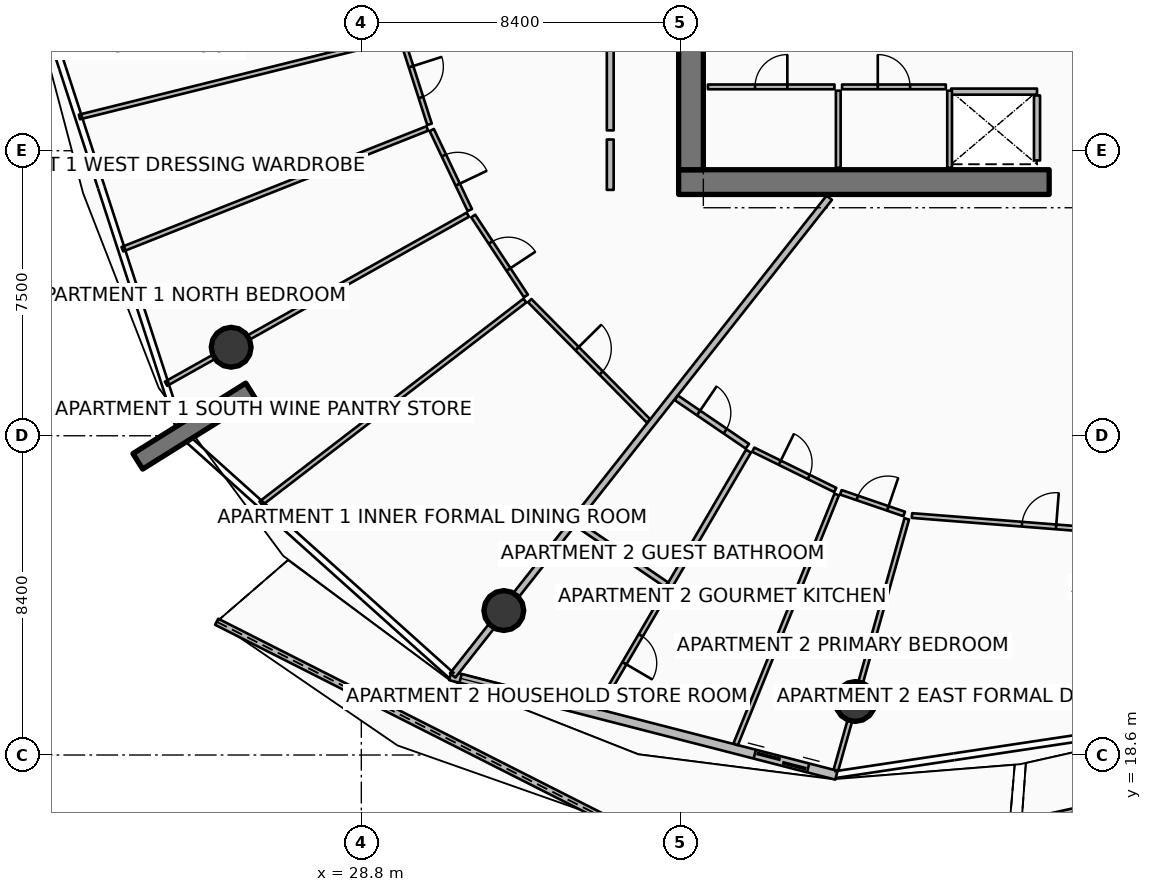
"""IFC4 building model, lengths in metres.
Left out: names, types, materials, properties, quantities, classifications, styles, units other than length and angle.
Written with IfcOpenShell. Run it as: python <this file> out.ifc"""

import sys

from ifc_helpers import new_model, si_unit, direction, frame, frame_2d, origin, origin_2d, place, context, subcontext, project, spatial, polyline, rectangle, circle, outline, extrude, element, fill, save


model = new_model("IFC4")
c1 = context("Model", 3, precision=1e-05, world=origin(), true_north=direction((0.0, 1.0)))
c2 = subcontext(c1, "Body", "Model", "MODEL_VIEW")
j1 = project(units=[si_unit("LENGTHUNIT", "METRE"), si_unit("PLANEANGLEUNIT", "RADIAN")], contexts=[c1])
p1 = place(None, origin())
s1 = spatial("IfcSite", under=j1, at=p1, CompositionType="ELEMENT")
p2 = place(p1, origin())
s2 = spatial("IfcBuilding", under=s1, at=p2, CompositionType="ELEMENT")
p3 = place(p2, frame((0.0, 0.0, 217.8)))
s3 = spatial("IfcBuildingStorey", under=s2, at=p3, CompositionType="ELEMENT", Elevation=217.8)
p4 = place(p3, frame((37.15, 33.675, 0.0), z_axis=(0.0, 0.0, 1.0), x_axis=(1.0, 0.0, 0.0)))
e1 = element("IfcWall", 1, at=p4, inside=s3, PredefinedType="SHEAR", context=c2, shape_type="SweptSolid", body=[
    extrude(rectangle(XDim=9.75, YDim=0.65, at=frame_2d((4.875, 0.0))), origin(), (0.0, 0.0, 1.0), 3.75),
])
p5 = place(p3, frame((37.475, 34.0, 0.0), z_axis=(0.0, 0.0, 1.0), x_axis=(0.0, 1.0, 0.0)))
e2 = element("IfcWall", 2, at=p5, inside=s3, PredefinedType="SHEAR", context=c2, shape_type="SweptSolid", body=[
    extrude(rectangle(XDim=16.0, YDim=0.65, at=frame_2d((8.0, 0.0))), origin(), (0.0, 0.0, 1.0), 3.75),
])
p6 = place(p3, frame((25.886, 28.182, 0.0), z_axis=(0.0, 0.0, 1.0), x_axis=(-0.848033572426, -0.529942506352, 0.0)))
e3 = element("IfcWall", 3, at=p6, inside=s3, PredefinedType="SOLIDWALL", context=c2, shape_type="SweptSolid", body=[
    extrude(rectangle(XDim=3.5, YDim=0.48, at=frame_2d((1.75, 0.0))), origin(), (0.0, 0.0, 1.0), 3.75),
])
for number, where, z_axis, x_axis in (
    (4, (25.375, 29.329, 0.0), (0.0, 0.0, 1.0), (1.0, 0.0, 0.0)),
    (5, (32.549, 22.401, 0.0), (0.0, 0.0, 1.0), (1.0, 0.0, 0.0)),
    (6, (41.798, 20.008, 0.0), (0.0, 0.0, 1.0), (1.0, 0.0, 0.0)),
):
    element("IfcColumn", number, at=place(p3, frame(where, z_axis=z_axis, x_axis=x_axis)), inside=s3, PredefinedType="COLUMN", context=c2, shape_type="SweptSolid", body=[
        extrude(circle(Radius=0.525, at=origin_2d()), origin(), (0.0, 0.0, 1.0), 3.5),
    ])
p7 = place(p3, frame((24.994, 22.107, 0.0), z_axis=(0.0, 0.0, 1.0), x_axis=(0.892126203774, -0.451786273076, 0.0)))
e7 = element("IfcWall", 7, at=p7, inside=s3, PredefinedType="PARAPET", context=c2, shape_type="SweptSolid", body=[
    extrude(outline(polyline([(0.0, 0.0), (11.347, 0.0), (11.347, 1.348), (5.674, 1.562), (0.0, 1.747), (0.0, 0.0)])), frame((0.0, 0.09, 0.0), z_axis=(0.0, -1.0, 0.0), x_axis=(1.0, 0.0, 0.0)), (0.0, 0.0, 1.0), 0.18),
])
p8 = place(p3, frame((46.172, 16.807, 0.0), z_axis=(0.0, 0.0, 1.0), x_axis=(0.976834914213, 0.213994276499, 0.0)))
e8 = element("IfcWall", 8, at=p8, inside=s3, PredefinedType="PARAPET", context=c2, shape_type="SweptSolid", body=[
    extrude(outline(polyline([(0.0, 0.0), (9.45, 0.0), (9.45, 1.348), (4.725, 1.182), (0.0, 1.12), (0.0, 0.0)])), frame((0.0, 0.09, 0.0), z_axis=(0.0, -1.0, 0.0), x_axis=(1.0, 0.0, 0.0)), (0.0, 0.0, 1.0), 0.18),
])
p9 = place(p3, frame((31.14, 20.687, 0.0), z_axis=(0.0, 0.0, 1.0), x_axis=(0.968374028006, -0.249502989727, 0.0)))
e9 = element("IfcWall", 9, at=p9, inside=s3, PredefinedType="SOLIDWALL", context=c2, shape_type="SweptSolid", body=[
    extrude(rectangle(XDim=10.494, YDim=0.24, at=frame_2d((5.247, 0.0))), origin(), (0.0, 0.0, 1.0), 2.45),
])
p10 = place(p9, frame((8.274, 0.0, 0.0)))
e10 = element("IfcOpeningElement", 10, at=p10, cuts=e9, PredefinedType="OPENING", context=c2, shape_type="SweptSolid", body=[
    extrude(rectangle(XDim=1.45, YDim=2.15, at=frame_2d((0.725, 1.075))), frame((0.0, 0.13, 0.0), z_axis=(0.0, -1.0, 0.0), x_axis=(1.0, 0.0, 0.0)), (0.0, 0.0, 1.0), 0.26),
])
p11 = place(p9, frame((0.28, 0.0, 0.65)))
e11 = element("IfcOpeningElement", 11, at=p11, cuts=e9, PredefinedType="OPENING", context=c2, shape_type="SweptSolid", body=[
    extrude(rectangle(XDim=1.6, YDim=1.5, at=frame_2d((0.8, 0.75))), frame((0.0, 0.13, 0.0), z_axis=(0.0, -1.0, 0.0), x_axis=(1.0, 0.0, 0.0)), (0.0, 0.0, 1.0), 0.26),
])
p12 = place(p3, frame((44.32, 36.055, 0.0), z_axis=(0.0, 0.0, 1.0), x_axis=(1.0, 0.0, 0.0)))
e12 = element("IfcWall", 12, at=p12, inside=s3, PredefinedType="PARTITIONING", context=c2, shape_type="SweptSolid", body=[
    extrude(rectangle(XDim=2.26, YDim=0.16, at=frame_2d((1.13, 0.0))), origin(), (0.0, 0.0, 1.0), 3.5),
])
p13 = place(p3, frame((46.58, 34.245, 0.0), z_axis=(0.0, 0.0, 1.0), x_axis=(0.0, 1.0, 0.0)))
e13 = element("IfcWall", 13, at=p13, inside=s3, PredefinedType="PARTITIONING", context=c2, shape_type="SweptSolid", body=[
    extrude(rectangle(XDim=1.71, YDim=0.16, at=frame_2d((0.855, 0.0))), origin(), (0.0, 0.0, 1.0), 3.5),
])
for number, where, z_axis, x_axis in (
    (14, (44.28, 34.05, 0.0), (0.0, 0.0, 1.0), (0.0, 1.0, 0.0)),
    (15, (41.35, 34.05, 0.0), (0.0, 0.0, 1.0), (0.0, 1.0, 0.0)),
):
    element("IfcWall", number, at=place(p3, frame(where, z_axis=z_axis, x_axis=x_axis)), inside=s3, PredefinedType="PARTITIONING", context=c2, shape_type="SweptSolid", body=[
        extrude(rectangle(XDim=2.03, YDim=0.125, at=frame_2d((1.015, 0.0))), origin(), (0.0, 0.0, 1.0), 2.94),
    ])
p14 = place(p3, frame((37.92, 36.18, 0.0), z_axis=(0.0, 0.0, 1.0), x_axis=(1.0, 0.0, 0.0)))
e16 = element("IfcWall", 16, at=p14, inside=s3, PredefinedType="PARTITIONING", context=c2, shape_type="SweptSolid", body=[
    extrude(rectangle(XDim=3.33, YDim=0.125, at=frame_2d((1.665, 0.0))), origin(), (0.0, 0.0, 1.0), 2.94),
])
p15 = place(p14, frame((1.24, 0.0, 0.0)))
e17 = element("IfcOpeningElement", 17, at=p15, cuts=e16, PredefinedType="OPENING", context=c2, shape_type="SweptSolid", body=[
    extrude(rectangle(XDim=0.85, YDim=2.06, at=frame_2d((0.425, 1.03))), frame((0.0, 0.073, 0.0), z_axis=(0.0, -1.0, 0.0), x_axis=(1.0, 0.0, 0.0)), (0.0, 0.0, 1.0), 0.145),
])
p16 = place(p3, frame((41.45, 36.18, 0.0), z_axis=(0.0, 0.0, 1.0), x_axis=(1.0, 0.0, 0.0)))
e18 = element("IfcWall", 18, at=p16, inside=s3, PredefinedType="PARTITIONING", context=c2, shape_type="SweptSolid", body=[
    extrude(rectangle(XDim=2.73, YDim=0.125, at=frame_2d((1.365, 0.0))), origin(), (0.0, 0.0, 1.0), 2.94),
])
p17 = place(p16, frame((0.94, 0.0, 0.0)))
e19 = element("IfcOpeningElement", 19, at=p17, cuts=e18, PredefinedType="OPENING", context=c2, shape_type="SweptSolid", body=[
    extrude(rectangle(XDim=0.85, YDim=2.06, at=frame_2d((0.425, 1.03))), frame((0.0, 0.073, 0.0), z_axis=(0.0, -1.0, 0.0), x_axis=(1.0, 0.0, 0.0)), (0.0, 0.0, 1.0), 0.145),
])
p18 = place(p3, frame((41.113, 33.264, 0.0), z_axis=(0.0, 0.0, 1.0), x_axis=(-0.619089233189, -0.785320648748, 0.0)))
e20 = element("IfcWall", 20, at=p18, inside=s3, PredefinedType="PARTITIONING", context=c2, shape_type="SweptSolid", body=[
    extrude(rectangle(XDim=16.006, YDim=0.18, at=frame_2d((8.003, 0.0))), origin(), (0.0, 0.0, 1.0), 2.94),
])
p19 = place(p3, frame((35.35, 40.383, 0.0), z_axis=(0.0, 0.0, 1.0), x_axis=(0.0, -1.0, 0.0)))
e21 = element("IfcWall", 21, at=p19, inside=s3, PredefinedType="PARTITIONING", context=c2, shape_type="SweptSolid", body=[
    extrude(rectangle(XDim=5.347, YDim=0.18, at=frame_2d((2.674, 0.0))), origin(), (0.0, 0.0, 1.0), 2.94),
])
p20 = place(p3, frame((29.77, 37.472, 0.0), z_axis=(0.0, 0.0, 1.0), x_axis=(-0.970505283608, -0.241079850857, 0.0)))
e22 = element("IfcWall", 22, at=p20, inside=s3, PredefinedType="PARTITIONING", context=c2, shape_type="SweptSolid", body=[
    extrude(rectangle(XDim=8.643, YDim=0.125, at=frame_2d((4.322, 0.0))), origin(), (0.0, 0.0, 1.0), 2.94),
])
p21 = place(p3, frame((30.535, 35.085, 0.0), z_axis=(0.0, 0.0, 1.0), x_axis=(-0.929776352491, -0.368124889607, 0.0)))
e23 = element("IfcWall", 23, at=p21, inside=s3, PredefinedType="PARTITIONING", context=c2, shape_type="SweptSolid", body=[
    extrude(rectangle(XDim=8.629, YDim=0.125, at=frame_2d((4.314, 0.0))), origin(), (0.0, 0.0, 1.0), 2.94),
])
p22 = place(p3, frame((29.882, 37.417, 0.0), z_axis=(0.0, 0.0, 1.0), x_axis=(0.305348810802, -0.952240570309, 0.0)))
e24 = element("IfcWall", 24, at=p22, inside=s3, PredefinedType="PARTITIONING", context=c2, shape_type="SweptSolid", body=[
    extrude(rectangle(XDim=2.334, YDim=0.125, at=frame_2d((1.167, 0.0))), origin(), (0.0, 0.0, 1.0), 2.94),
])
p23 = place(p22, frame((0.742, 0.0, 0.0)))
e25 = element("IfcOpeningElement", 25, at=p23, cuts=e24, PredefinedType="OPENING", context=c2, shape_type="SweptSolid", body=[
    extrude(rectangle(XDim=0.85, YDim=2.06, at=frame_2d((0.425, 1.03))), frame((0.0, 0.073, 0.0), z_axis=(0.0, -1.0, 0.0), x_axis=(1.0, 0.0, 0.0)), (0.0, 0.0, 1.0), 0.145),
])
p24 = place(p3, frame((30.653, 35.046, 0.0), z_axis=(0.0, 0.0, 1.0), x_axis=(0.429385363207, -0.903121370506, 0.0)))
e26 = element("IfcWall", 26, at=p24, inside=s3, PredefinedType="PARTITIONING", context=c2, shape_type="SweptSolid", body=[
    extrude(rectangle(XDim=2.334, YDim=0.125, at=frame_2d((1.167, 0.0))), origin(), (0.0, 0.0, 1.0), 2.94),
])
p25 = place(p24, frame((0.742, 0.0, 0.0)))
e27 = element("IfcOpeningElement", 27, at=p25, cuts=e26, PredefinedType="OPENING", context=c2, shape_type="SweptSolid", body=[
    extrude(rectangle(XDim=0.85, YDim=2.06, at=frame_2d((0.425, 1.03))), frame((0.0, 0.073, 0.0), z_axis=(0.0, -1.0, 0.0), x_axis=(1.0, 0.0, 0.0)), (0.0, 0.0, 1.0), 0.145),
])
p26 = place(p3, frame((35.35, 34.796, 0.0), z_axis=(0.0, 0.0, 1.0), x_axis=(0.0, -1.0, 0.0)))
e28 = element("IfcWall", 28, at=p26, inside=s3, PredefinedType="PARTITIONING", context=c2, shape_type="SweptSolid", body=[
    extrude(rectangle(XDim=1.326, YDim=0.18, at=frame_2d((0.663, 0.0))), origin(), (0.0, 0.0, 1.0), 2.94),
])
p27 = place(p3, frame((31.602, 32.817, 0.0), z_axis=(0.0, 0.0, 1.0), x_axis=(-0.872494579812, -0.488623790047, 0.0)))
e29 = element("IfcWall", 29, at=p27, inside=s3, PredefinedType="PARTITIONING", context=c2, shape_type="SweptSolid", body=[
    extrude(rectangle(XDim=9.101, YDim=0.125, at=frame_2d((4.551, 0.0))), origin(), (0.0, 0.0, 1.0), 2.94),
])
p28 = place(p3, frame((33.104, 30.557, 0.0), z_axis=(0.0, 0.0, 1.0), x_axis=(-0.793029985802, -0.609182601212, 0.0)))
e30 = element("IfcWall", 30, at=p28, inside=s3, PredefinedType="PARTITIONING", context=c2, shape_type="SweptSolid", body=[
    extrude(rectangle(XDim=8.759, YDim=0.125, at=frame_2d((4.38, 0.0))), origin(), (0.0, 0.0, 1.0), 2.94),
])
p29 = place(p3, frame((31.745, 32.782, 0.0), z_axis=(0.0, 0.0, 1.0), x_axis=(0.550331787139, -0.834946060572, 0.0)))
e31 = element("IfcWall", 31, at=p29, inside=s3, PredefinedType="PARTITIONING", context=c2, shape_type="SweptSolid", body=[
    extrude(rectangle(XDim=2.519, YDim=0.125, at=frame_2d((1.26, 0.0))), origin(), (0.0, 0.0, 1.0), 2.94),
])
p30 = place(p29, frame((0.835, 0.0, 0.0)))
e32 = element("IfcOpeningElement", 32, at=p30, cuts=e31, PredefinedType="OPENING", context=c2, shape_type="SweptSolid", body=[
    extrude(rectangle(XDim=0.85, YDim=2.06, at=frame_2d((0.425, 1.03))), frame((0.0, 0.073, 0.0), z_axis=(0.0, -1.0, 0.0), x_axis=(1.0, 0.0, 0.0)), (0.0, 0.0, 1.0), 0.145),
])
p31 = place(p3, frame((33.231, 30.555, 0.0), z_axis=(0.0, 0.0, 1.0), x_axis=(0.702646714281, -0.711538892057, 0.0)))
e33 = element("IfcWall", 33, at=p31, inside=s3, PredefinedType="PARTITIONING", context=c2, shape_type="SweptSolid", body=[
    extrude(rectangle(XDim=4.448, YDim=0.125, at=frame_2d((2.224, 0.0))), origin(), (0.0, 0.0, 1.0), 2.94),
])
p32 = place(p31, frame((1.774, 0.0, 0.0)))
e34 = element("IfcOpeningElement", 34, at=p32, cuts=e33, PredefinedType="OPENING", context=c2, shape_type="SweptSolid", body=[
    extrude(rectangle(XDim=0.9, YDim=2.08, at=frame_2d((0.45, 1.04))), frame((0.0, 0.073, 0.0), z_axis=(0.0, -1.0, 0.0), x_axis=(1.0, 0.0, 0.0)), (0.0, 0.0, 1.0), 0.145),
])
p33 = place(p3, frame((37.089, 27.999, 0.0), z_axis=(0.0, 0.0, 1.0), x_axis=(0.826211362519, -0.563360261684, 0.0)))
e35 = element("IfcWall", 35, at=p33, inside=s3, PredefinedType="PARTITIONING", context=c2, shape_type="SweptSolid", body=[
    extrude(rectangle(XDim=2.263, YDim=0.15, at=frame_2d((1.131, 0.0))), origin(), (0.0, 0.0, 1.0), 2.94),
])
p34 = place(p33, frame((0.706, 0.0, 0.0)))
e36 = element("IfcOpeningElement", 36, at=p34, cuts=e35, PredefinedType="OPENING", context=c2, shape_type="SweptSolid", body=[
    extrude(rectangle(XDim=0.85, YDim=2.06, at=frame_2d((0.425, 1.03))), frame((0.0, 0.085, 0.0), z_axis=(0.0, -1.0, 0.0), x_axis=(1.0, 0.0, 0.0)), (0.0, 0.0, 1.0), 0.17),
])
p35 = place(p3, frame((34.477, 24.685, 0.0), z_axis=(0.0, 0.0, 1.0), x_axis=(0.826196481555, -0.563382085148, 0.0)))
e37 = element("IfcWall", 37, at=p35, inside=s3, PredefinedType="PARTITIONING", context=c2, shape_type="SweptSolid", body=[
    extrude(rectangle(XDim=2.845, YDim=0.15, at=frame_2d((1.423, 0.0))), origin(), (0.0, 0.0, 1.0), 2.94),
])
p36 = place(p3, frame((38.988, 26.596, 0.0), z_axis=(0.0, 0.0, 1.0), x_axis=(-0.504984010109, -0.863128698129, 0.0)))
e38 = element("IfcWall", 38, at=p36, inside=s3, PredefinedType="PARTITIONING", context=c2, shape_type="SweptSolid", body=[
    extrude(rectangle(XDim=4.09, YDim=0.15, at=frame_2d((2.045, 0.0))), origin(), (0.0, 0.0, 1.0), 2.94),
])
p37 = place(p3, frame((36.857, 22.953, 0.0), z_axis=(0.0, 0.0, 1.0), x_axis=(-0.504954980617, -0.863145681533, 0.0)))
e39 = element("IfcWall", 39, at=p37, inside=s3, PredefinedType="PARTITIONING", context=c2, shape_type="SweptSolid", body=[
    extrude(rectangle(XDim=3.64, YDim=0.125, at=frame_2d((1.82, 0.0))), origin(), (0.0, 0.0, 1.0), 2.94),
])
p38 = place(p37, frame((1.395, 0.0, 0.0)))
e40 = element("IfcOpeningElement", 40, at=p38, cuts=e39, PredefinedType="OPENING", context=c2, shape_type="SweptSolid", body=[
    extrude(rectangle(XDim=0.85, YDim=2.06, at=frame_2d((0.425, 1.03))), frame((0.0, 0.073, 0.0), z_axis=(0.0, -1.0, 0.0), x_axis=(1.0, 0.0, 0.0)), (0.0, 0.0, 1.0), 0.145),
])
p39 = place(p3, frame((41.309, 25.455, 0.0), z_axis=(0.0, 0.0, 1.0), x_axis=(-0.374907525365, -0.927062213352, 0.0)))
e41 = element("IfcWall", 41, at=p39, inside=s3, PredefinedType="PARTITIONING", context=c2, shape_type="SweptSolid", body=[
    extrude(rectangle(XDim=7.092, YDim=0.125, at=frame_2d((3.546, 0.0))), origin(), (0.0, 0.0, 1.0), 2.94),
])
p40 = place(p3, frame((39.114, 26.634, 0.0), z_axis=(0.0, 0.0, 1.0), x_axis=(0.897413929061, -0.441189573683, 0.0)))
e42 = element("IfcWall", 42, at=p40, inside=s3, PredefinedType="PARTITIONING", context=c2, shape_type="SweptSolid", body=[
    extrude(rectangle(XDim=2.403, YDim=0.125, at=frame_2d((1.202, 0.0))), origin(), (0.0, 0.0, 1.0), 2.94),
])
p41 = place(p40, frame((0.777, 0.0, 0.0)))
e43 = element("IfcOpeningElement", 43, at=p41, cuts=e42, PredefinedType="OPENING", context=c2, shape_type="SweptSolid", body=[
    extrude(rectangle(XDim=0.85, YDim=2.06, at=frame_2d((0.425, 1.03))), frame((0.0, 0.073, 0.0), z_axis=(0.0, -1.0, 0.0), x_axis=(1.0, 0.0, 0.0)), (0.0, 0.0, 1.0), 0.145),
])
p42 = place(p3, frame((41.418, 25.512, 0.0), z_axis=(0.0, 0.0, 1.0), x_axis=(0.946216458122, -0.32353425534, 0.0)))
e44 = element("IfcWall", 44, at=p42, inside=s3, PredefinedType="PARTITIONING", context=c2, shape_type="SweptSolid", body=[
    extrude(rectangle(XDim=1.762, YDim=0.125, at=frame_2d((0.881, 0.0))), origin(), (0.0, 0.0, 1.0), 2.94),
])
p43 = place(p42, frame((0.456, 0.0, 0.0)))
e45 = element("IfcOpeningElement", 45, at=p43, cuts=e44, PredefinedType="OPENING", context=c2, shape_type="SweptSolid", body=[
    extrude(rectangle(XDim=0.85, YDim=2.06, at=frame_2d((0.425, 1.03))), frame((0.0, 0.073, 0.0), z_axis=(0.0, -1.0, 0.0), x_axis=(1.0, 0.0, 0.0)), (0.0, 0.0, 1.0), 0.145),
])
p44 = place(p3, frame((43.153, 24.813, 0.0), z_axis=(0.0, 0.0, 1.0), x_axis=(-0.271433998897, -0.962457055791, 0.0)))
e46 = element("IfcWall", 46, at=p44, inside=s3, PredefinedType="PARTITIONING", context=c2, shape_type="SweptSolid", body=[
    extrude(rectangle(XDim=6.87, YDim=0.125, at=frame_2d((3.435, 0.0))), origin(), (0.0, 0.0, 1.0), 2.94),
])
p45 = place(p3, frame((43.29, 24.901, 0.0), z_axis=(0.0, 0.0, 1.0), x_axis=(0.996916756268, -0.078466432773, 0.0)))
e47 = element("IfcWall", 47, at=p45, inside=s3, PredefinedType="PARTITIONING", context=c2, shape_type="SweptSolid", body=[
    extrude(rectangle(XDim=6.708, YDim=0.125, at=frame_2d((3.354, 0.0))), origin(), (0.0, 0.0, 1.0), 2.94),
])
p46 = place(p45, frame((2.904, 0.0, 0.0)))
e48 = element("IfcOpeningElement", 48, at=p46, cuts=e47, PredefinedType="OPENING", context=c2, shape_type="SweptSolid", body=[
    extrude(rectangle(XDim=0.9, YDim=2.08, at=frame_2d((0.45, 1.04))), frame((0.0, 0.073, 0.0), z_axis=(0.0, -1.0, 0.0), x_axis=(1.0, 0.0, 0.0)), (0.0, 0.0, 1.0), 0.145),
])
p47 = place(p10, origin())
e49 = element("IfcDoor", 49, at=p47, inside=s3, OperationType="DOUBLE_DOOR_SLIDING", PredefinedType="DOOR", context=c2, shape_type="SweptSolid", body=[
    extrude(rectangle(XDim=1.45, YDim=2.15, at=frame_2d((0.725, 1.075))), frame((0.0, 0.025, 0.0), z_axis=(0.0, -1.0, 0.0), x_axis=(1.0, 0.0, 0.0)), (0.0, 0.0, 1.0), 0.05),
])
fill(e10, e49)
p48 = place(p11, origin())
e50 = element("IfcWindow", 50, at=p48, inside=s3, PartitioningType="SINGLE_PANEL", PredefinedType="WINDOW", context=c2, shape_type="SweptSolid", body=[
    extrude(rectangle(XDim=1.6, YDim=1.5, at=frame_2d((0.8, 0.75))), frame((0.0, 0.03, 0.0), z_axis=(0.0, -1.0, 0.0), x_axis=(1.0, 0.0, 0.0)), (0.0, 0.0, 1.0), 0.06),
])
fill(e11, e50)
p49 = place(p15, origin())
e51 = element("IfcDoor", 51, at=p49, inside=s3, OperationType="SINGLE_SWING_RIGHT", PredefinedType="DOOR", context=c2, shape_type="SweptSolid", body=[
    extrude(rectangle(XDim=0.85, YDim=2.06, at=frame_2d((0.425, 1.03))), frame((0.0, 0.025, 0.0), z_axis=(0.0, -1.0, 0.0), x_axis=(1.0, 0.0, 0.0)), (0.0, 0.0, 1.0), 0.05),
])
fill(e17, e51)
p50 = place(p17, origin())
e52 = element("IfcDoor", 52, at=p50, inside=s3, OperationType="SINGLE_SWING_LEFT", PredefinedType="DOOR", context=c2, shape_type="SweptSolid", body=[
    extrude(rectangle(XDim=0.85, YDim=2.06, at=frame_2d((0.425, 1.03))), frame((0.0, 0.025, 0.0), z_axis=(0.0, -1.0, 0.0), x_axis=(1.0, 0.0, 0.0)), (0.0, 0.0, 1.0), 0.05),
])
fill(e19, e52)
p51 = place(p23, origin())
e53 = element("IfcDoor", 53, at=p51, inside=s3, OperationType="SINGLE_SWING_LEFT", PredefinedType="DOOR", context=c2, shape_type="SweptSolid", body=[
    extrude(rectangle(XDim=0.85, YDim=2.06, at=frame_2d((0.425, 1.03))), frame((0.0, 0.025, 0.0), z_axis=(0.0, -1.0, 0.0), x_axis=(1.0, 0.0, 0.0)), (0.0, 0.0, 1.0), 0.05),
])
fill(e25, e53)
p52 = place(p25, origin())
e54 = element("IfcDoor", 54, at=p52, inside=s3, OperationType="SINGLE_SWING_RIGHT", PredefinedType="DOOR", context=c2, shape_type="SweptSolid", body=[
    extrude(rectangle(XDim=0.85, YDim=2.06, at=frame_2d((0.425, 1.03))), frame((0.0, 0.025, 0.0), z_axis=(0.0, -1.0, 0.0), x_axis=(1.0, 0.0, 0.0)), (0.0, 0.0, 1.0), 0.05),
])
fill(e27, e54)
p53 = place(p30, origin())
e55 = element("IfcDoor", 55, at=p53, inside=s3, OperationType="SINGLE_SWING_RIGHT", PredefinedType="DOOR", context=c2, shape_type="SweptSolid", body=[
    extrude(rectangle(XDim=0.85, YDim=2.06, at=frame_2d((0.425, 1.03))), frame((0.0, 0.025, 0.0), z_axis=(0.0, -1.0, 0.0), x_axis=(1.0, 0.0, 0.0)), (0.0, 0.0, 1.0), 0.05),
])
fill(e32, e55)
p54 = place(p32, origin())
e56 = element("IfcDoor", 56, at=p54, inside=s3, OperationType="SINGLE_SWING_LEFT", PredefinedType="DOOR", context=c2, shape_type="SweptSolid", body=[
    extrude(rectangle(XDim=0.9, YDim=2.08, at=frame_2d((0.45, 1.04))), frame((0.0, 0.025, 0.0), z_axis=(0.0, -1.0, 0.0), x_axis=(1.0, 0.0, 0.0)), (0.0, 0.0, 1.0), 0.05),
])
fill(e34, e56)
p55 = place(p34, origin())
e57 = element("IfcDoor", 57, at=p55, inside=s3, OperationType="SINGLE_SWING_LEFT", PredefinedType="DOOR", context=c2, shape_type="SweptSolid", body=[
    extrude(rectangle(XDim=0.85, YDim=2.06, at=frame_2d((0.425, 1.03))), frame((0.0, 0.025, 0.0), z_axis=(0.0, -1.0, 0.0), x_axis=(1.0, 0.0, 0.0)), (0.0, 0.0, 1.0), 0.05),
])
fill(e36, e57)
p56 = place(p38, origin())
e58 = element("IfcDoor", 58, at=p56, inside=s3, OperationType="SINGLE_SWING_RIGHT", PredefinedType="DOOR", context=c2, shape_type="SweptSolid", body=[
    extrude(rectangle(XDim=0.85, YDim=2.06, at=frame_2d((0.425, 1.03))), frame((0.0, 0.025, 0.0), z_axis=(0.0, -1.0, 0.0), x_axis=(1.0, 0.0, 0.0)), (0.0, 0.0, 1.0), 0.05),
])
fill(e40, e58)
p57 = place(p41, origin())
e59 = element("IfcDoor", 59, at=p57, inside=s3, OperationType="SINGLE_SWING_LEFT", PredefinedType="DOOR", context=c2, shape_type="SweptSolid", body=[
    extrude(rectangle(XDim=0.85, YDim=2.06, at=frame_2d((0.425, 1.03))), frame((0.0, 0.025, 0.0), z_axis=(0.0, -1.0, 0.0), x_axis=(1.0, 0.0, 0.0)), (0.0, 0.0, 1.0), 0.05),
])
fill(e43, e59)
p58 = place(p43, origin())
e60 = element("IfcDoor", 60, at=p58, inside=s3, OperationType="SINGLE_SWING_RIGHT", PredefinedType="DOOR", context=c2, shape_type="SweptSolid", body=[
    extrude(rectangle(XDim=0.85, YDim=2.06, at=frame_2d((0.425, 1.03))), frame((0.0, 0.025, 0.0), z_axis=(0.0, -1.0, 0.0), x_axis=(1.0, 0.0, 0.0)), (0.0, 0.0, 1.0), 0.05),
])
fill(e45, e60)
p59 = place(p46, origin())
e61 = element("IfcDoor", 61, at=p59, inside=s3, OperationType="SINGLE_SWING_RIGHT", PredefinedType="DOOR", context=c2, shape_type="SweptSolid", body=[
    extrude(rectangle(XDim=0.9, YDim=2.08, at=frame_2d((0.45, 1.04))), frame((0.0, 0.025, 0.0), z_axis=(0.0, -1.0, 0.0), x_axis=(1.0, 0.0, 0.0)), (0.0, 0.0, 1.0), 0.05),
])
fill(e48, e61)
save(model, sys.argv[1])
